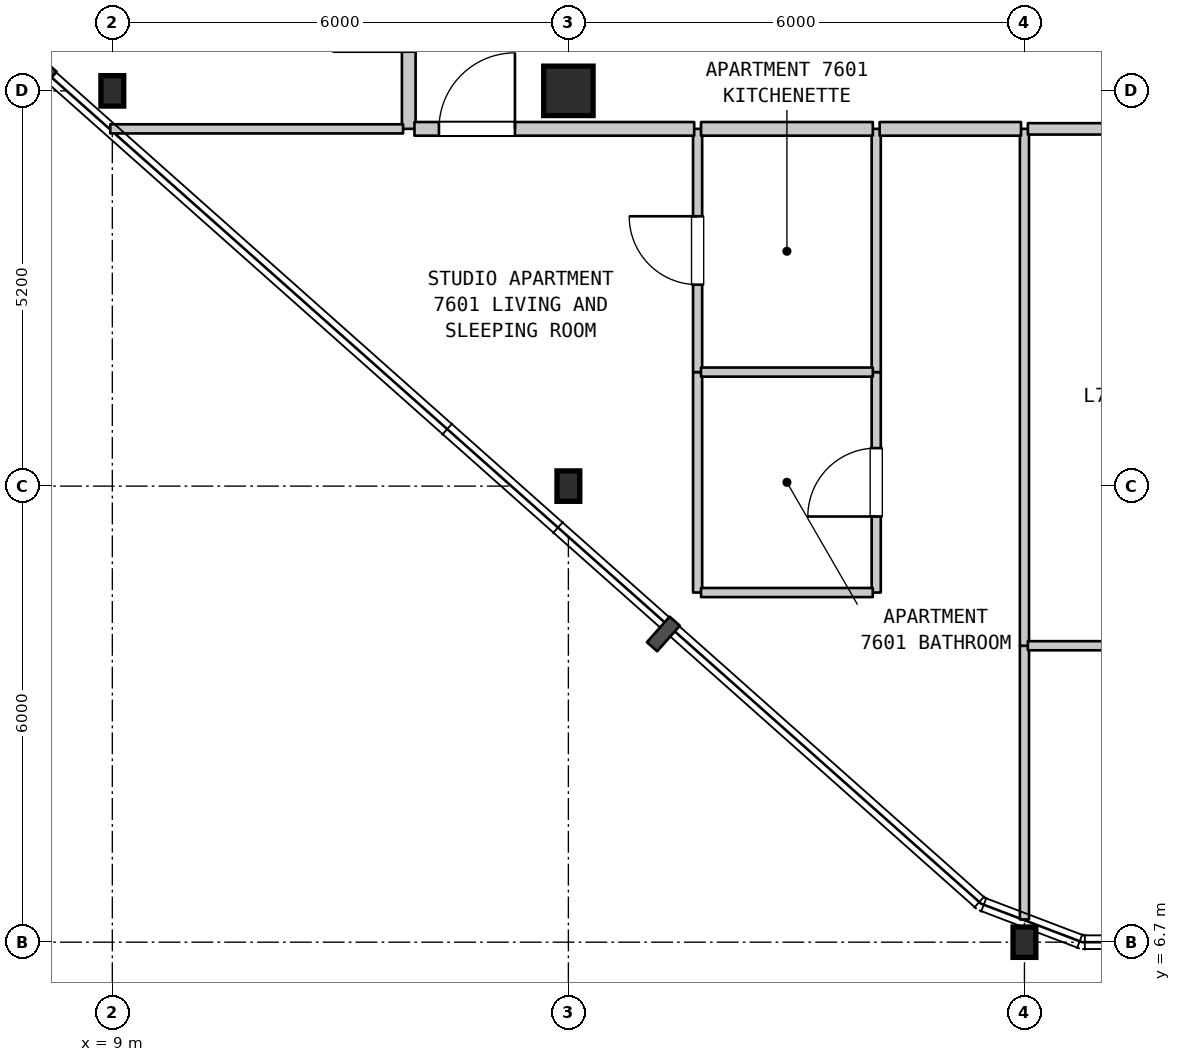
"""IFC4 building model, lengths in metres.
Left out: names, types, materials, properties, quantities, classifications, styles, units other than length and angle.
Written with IfcOpenShell. Run it as: python <this file> out.ifc"""

import sys

from ifc_helpers import new_model, si_unit, direction, frame, frame_2d, origin, origin_2d, place, context, subcontext, project, spatial, rectangle, i_section, extrude, element, fill, save


model = new_model("IFC4")
c1 = context("Model", 3, precision=1e-05, world=origin(), true_north=direction((0.0, 1.0)))
c2 = subcontext(c1, "Body", "Model", "MODEL_VIEW")
j1 = project(units=[si_unit("LENGTHUNIT", "METRE"), si_unit("PLANEANGLEUNIT", "RADIAN")], contexts=[c1])
p1 = place(None, origin())
s1 = spatial("IfcSite", under=j1, at=p1, CompositionType="ELEMENT")
p2 = place(p1, origin())
s2 = spatial("IfcBuilding", under=s1, at=p2, CompositionType="ELEMENT")
p3 = place(p2, frame((0.0, 0.0, 303.6)))
s3 = spatial("IfcBuildingStorey", under=s2, at=p3, CompositionType="ELEMENT", Elevation=303.6)
for number, where, z_axis, x_axis in (
    (1, (9.0, 17.9, 0.0), (0.0, 0.0, 1.0), (1.0, 0.0, 0.0)),
    (2, (15.0, 12.7, 0.0), (0.0, 0.0, 1.0), (1.0, 0.0, 0.0)),
):
    element("IfcColumn", number, at=place(p3, frame(where, z_axis=z_axis, x_axis=x_axis)), inside=s3, PredefinedType="COLUMN", context=c2, shape_type="SweptSolid", body=[
        extrude(i_section(OverallWidth=0.3, OverallDepth=0.4, WebThickness=0.013, FlangeThickness=0.024, FilletRadius=0.027, at=origin_2d()), origin(), (0.0, 0.0, 1.0), 3.7),
    ])
p4 = place(p3, frame((15.0, 17.9, 0.0), z_axis=(0.0, 0.0, 1.0), x_axis=(1.0, 0.0, 0.0)))
e3 = element("IfcColumn", 3, at=p4, inside=s3, PredefinedType="COLUMN", context=c2, shape_type="SweptSolid", body=[
    extrude(rectangle(XDim=0.65, YDim=0.65, at=origin_2d()), origin(), (0.0, 0.0, 1.0), 3.7),
])
p5 = place(p3, frame((21.0, 6.7, 0.0), z_axis=(0.0, 0.0, 1.0), x_axis=(1.0, 0.0, 0.0)))
e4 = element("IfcColumn", 4, at=p5, inside=s3, PredefinedType="COLUMN", context=c2, shape_type="SweptSolid", body=[
    extrude(i_section(OverallWidth=0.3, OverallDepth=0.4, WebThickness=0.013, FlangeThickness=0.024, FilletRadius=0.027, at=origin_2d()), origin(), (0.0, 0.0, 1.0), 3.7),
])
p6 = place(p3, frame((12.9, 17.4, 0.0), z_axis=(0.0, 0.0, 1.0), x_axis=(0.0, 1.0, 0.0)))
e5 = element("IfcWall", 5, at=p6, inside=s3, PredefinedType="STANDARD", context=c2, shape_type="SweptSolid", body=[
    extrude(rectangle(XDim=3.18, YDim=0.18, at=frame_2d((1.59, 0.0))), origin(), (0.0, 0.0, 1.0), 3.39),
])
p7 = place(p6, frame((1.015, 0.0, 0.0)))
e6 = element("IfcOpeningElement", 6, at=p7, cuts=e5, PredefinedType="OPENING", context=c2, shape_type="SweptSolid", body=[
    extrude(rectangle(XDim=1.0, YDim=2.15, at=frame_2d((0.5, 1.075))), frame((0.0, 0.1, 0.0), z_axis=(0.0, -1.0, 0.0), x_axis=(1.0, 0.0, 0.0)), (0.0, 0.0, 1.0), 0.2),
])
p8 = place(p3, frame((16.7, 11.3, 0.0), z_axis=(0.0, 0.0, 1.0), x_axis=(0.0, 1.0, 0.0)))
e7 = element("IfcWall", 7, at=p8, inside=s3, PredefinedType="PARTITIONING", context=c2, shape_type="SweptSolid", body=[
    extrude(rectangle(XDim=2.9, YDim=0.12, at=frame_2d((1.45, 0.0))), origin(), (0.0, 0.0, 1.0), 3.39),
])
p9 = place(p3, frame((16.7, 14.2, 0.0), z_axis=(0.0, 0.0, 1.0), x_axis=(0.0, 1.0, 0.0)))
e8 = element("IfcWall", 8, at=p9, inside=s3, PredefinedType="PARTITIONING", context=c2, shape_type="SweptSolid", body=[
    extrude(rectangle(XDim=3.2, YDim=0.12, at=frame_2d((1.6, 0.0))), origin(), (0.0, 0.0, 1.0), 3.39),
])
p10 = place(p9, frame((1.15, 0.0, 0.0)))
e9 = element("IfcOpeningElement", 9, at=p10, cuts=e8, PredefinedType="OPENING", context=c2, shape_type="SweptSolid", body=[
    extrude(rectangle(XDim=0.9, YDim=2.15, at=frame_2d((0.45, 1.075))), frame((0.0, 0.07, 0.0), z_axis=(0.0, -1.0, 0.0), x_axis=(1.0, 0.0, 0.0)), (0.0, 0.0, 1.0), 0.14),
])
p11 = place(p3, frame((19.05, 11.3, 0.0), z_axis=(0.0, 0.0, 1.0), x_axis=(0.0, 1.0, 0.0)))
e10 = element("IfcWall", 10, at=p11, inside=s3, PredefinedType="PARTITIONING", context=c2, shape_type="SweptSolid", body=[
    extrude(rectangle(XDim=2.9, YDim=0.12, at=frame_2d((1.45, 0.0))), origin(), (0.0, 0.0, 1.0), 3.39),
])
p12 = place(p11, frame((1.0, 0.0, 0.0)))
e11 = element("IfcOpeningElement", 11, at=p12, cuts=e10, PredefinedType="OPENING", context=c2, shape_type="SweptSolid", body=[
    extrude(rectangle(XDim=0.9, YDim=2.1, at=frame_2d((0.45, 1.05))), frame((0.0, 0.07, 0.0), z_axis=(0.0, -1.0, 0.0), x_axis=(1.0, 0.0, 0.0)), (0.0, 0.0, 1.0), 0.14),
])
p13 = place(p3, frame((19.05, 14.2, 0.0), z_axis=(0.0, 0.0, 1.0), x_axis=(0.0, 1.0, 0.0)))
e12 = element("IfcWall", 12, at=p13, inside=s3, PredefinedType="PARTITIONING", context=c2, shape_type="SweptSolid", body=[
    extrude(rectangle(XDim=3.2, YDim=0.12, at=frame_2d((1.6, 0.0))), origin(), (0.0, 0.0, 1.0), 3.39),
])
p14 = place(p3, frame((21.0, 6.999, 0.0), z_axis=(0.0, 0.0, 1.0), x_axis=(0.0, 1.0, 0.0)))
e13 = element("IfcWall", 13, at=p14, inside=s3, PredefinedType="PARTITIONING", context=c2, shape_type="SweptSolid", body=[
    extrude(rectangle(XDim=3.601, YDim=0.12, at=frame_2d((1.801, 0.0))), origin(), (0.0, 0.0, 1.0), 3.39),
])
p15 = place(p3, frame((21.0, 10.6, 0.0), z_axis=(0.0, 0.0, 1.0), x_axis=(0.0, 1.0, 0.0)))
e14 = element("IfcWall", 14, at=p15, inside=s3, PredefinedType="PARTITIONING", context=c2, shape_type="SweptSolid", body=[
    extrude(rectangle(XDim=6.8, YDim=0.12, at=frame_2d((3.4, 0.0))), origin(), (0.0, 0.0, 1.0), 3.39),
])
p16 = place(p3, frame((21.045, 10.6, 0.0), z_axis=(0.0, 0.0, 1.0), x_axis=(1.0, 0.0, 0.0)))
e15 = element("IfcWall", 15, at=p16, inside=s3, PredefinedType="PARTITIONING", context=c2, shape_type="SweptSolid", body=[
    extrude(rectangle(XDim=3.91, YDim=0.12, at=frame_2d((1.955, 0.0))), origin(), (0.0, 0.0, 1.0), 3.39),
])
for number, where, z_axis, x_axis in (
    (16, (16.745, 11.3, 0.0), (0.0, 0.0, 1.0), (1.0, 0.0, 0.0)),
    (17, (16.745, 14.2, 0.0), (0.0, 0.0, 1.0), (1.0, 0.0, 0.0)),
):
    element("IfcWall", number, at=place(p3, frame(where, z_axis=z_axis, x_axis=x_axis)), inside=s3, PredefinedType="PARTITIONING", context=c2, shape_type="SweptSolid", body=[
        extrude(rectangle(XDim=2.26, YDim=0.12, at=frame_2d((1.13, 0.0))), origin(), (0.0, 0.0, 1.0), 3.39),
    ])
p17 = place(p3, frame((8.973, 17.4, 0.0), z_axis=(0.0, 0.0, 1.0), x_axis=(1.0, 0.0, 0.0)))
e18 = element("IfcWall", 18, at=p17, inside=s3, PredefinedType="PARTITIONING", context=c2, shape_type="SweptSolid", body=[
    extrude(rectangle(XDim=3.852, YDim=0.12, at=frame_2d((1.926, 0.0))), origin(), (0.0, 0.0, 1.0), 3.39),
])
p18 = place(p3, frame((12.975, 17.4, 0.0), z_axis=(0.0, 0.0, 1.0), x_axis=(1.0, 0.0, 0.0)))
e19 = element("IfcWall", 19, at=p18, inside=s3, PredefinedType="STANDARD", context=c2, shape_type="SweptSolid", body=[
    extrude(rectangle(XDim=3.68, YDim=0.18, at=frame_2d((1.84, 0.0))), origin(), (0.0, 0.0, 1.0), 3.39),
])
p19 = place(p18, frame((0.322, 0.0, 0.0)))
e20 = element("IfcOpeningElement", 20, at=p19, cuts=e19, PredefinedType="OPENING", context=c2, shape_type="SweptSolid", body=[
    extrude(rectangle(XDim=1.0, YDim=2.15, at=frame_2d((0.5, 1.075))), frame((0.0, 0.1, 0.0), z_axis=(0.0, -1.0, 0.0), x_axis=(1.0, 0.0, 0.0)), (0.0, 0.0, 1.0), 0.2),
])
p20 = place(p3, frame((16.745, 17.4, 0.0), z_axis=(0.0, 0.0, 1.0), x_axis=(1.0, 0.0, 0.0)))
e21 = element("IfcWall", 21, at=p20, inside=s3, PredefinedType="STANDARD", context=c2, shape_type="SweptSolid", body=[
    extrude(rectangle(XDim=2.26, YDim=0.18, at=frame_2d((1.13, 0.0))), origin(), (0.0, 0.0, 1.0), 3.39),
])
p21 = place(p3, frame((19.095, 17.4, 0.0), z_axis=(0.0, 0.0, 1.0), x_axis=(1.0, 0.0, 0.0)))
e22 = element("IfcWall", 22, at=p21, inside=s3, PredefinedType="STANDARD", context=c2, shape_type="SweptSolid", body=[
    extrude(rectangle(XDim=1.86, YDim=0.18, at=frame_2d((0.93, 0.0))), origin(), (0.0, 0.0, 1.0), 3.39),
])
p22 = place(p3, frame((21.045, 17.4, 0.0), z_axis=(0.0, 0.0, 1.0), x_axis=(1.0, 0.0, 0.0)))
e23 = element("IfcWall", 23, at=p22, inside=s3, PredefinedType="STANDARD", context=c2, shape_type="SweptSolid", body=[
    extrude(rectangle(XDim=3.91, YDim=0.15, at=frame_2d((1.955, 0.0))), origin(), (0.0, 0.0, 1.0), 3.39),
])
p23 = place(p22, frame((1.455, 0.0, 0.0)))
e24 = element("IfcOpeningElement", 24, at=p23, cuts=e23, PredefinedType="OPENING", context=c2, shape_type="SweptSolid", body=[
    extrude(rectangle(XDim=1.0, YDim=2.15, at=frame_2d((0.5, 1.075))), frame((0.0, 0.085, 0.0), z_axis=(0.0, -1.0, 0.0), x_axis=(1.0, 0.0, 0.0)), (0.0, 0.0, 1.0), 0.17),
])
p24 = place(p10, origin())
e25 = element("IfcDoor", 25, at=p24, inside=s3, OperationType="SINGLE_SWING_RIGHT", PredefinedType="DOOR", context=c2, shape_type="SweptSolid", body=[
    extrude(rectangle(XDim=0.9, YDim=2.15, at=frame_2d((0.45, 1.075))), frame((0.0, 0.025, 0.0), z_axis=(0.0, -1.0, 0.0), x_axis=(1.0, 0.0, 0.0)), (0.0, 0.0, 1.0), 0.05),
])
fill(e9, e25)
p25 = place(p12, origin())
e26 = element("IfcDoor", 26, at=p25, inside=s3, OperationType="SINGLE_SWING_LEFT", PredefinedType="DOOR", context=c2, shape_type="SweptSolid", body=[
    extrude(rectangle(XDim=0.9, YDim=2.1, at=frame_2d((0.45, 1.05))), frame((0.0, 0.025, 0.0), z_axis=(0.0, -1.0, 0.0), x_axis=(1.0, 0.0, 0.0)), (0.0, 0.0, 1.0), 0.05),
])
fill(e11, e26)
p26 = place(p19, origin())
e27 = element("IfcDoor", 27, at=p26, inside=s3, OperationType="SINGLE_SWING_RIGHT", PredefinedType="DOOR", context=c2, shape_type="SweptSolid", body=[
    extrude(rectangle(XDim=1.0, YDim=2.15, at=frame_2d((0.5, 1.075))), frame((0.0, 0.025, 0.0), z_axis=(0.0, -1.0, 0.0), x_axis=(1.0, 0.0, 0.0)), (0.0, 0.0, 1.0), 0.05),
])
fill(e20, e27)
save(model, sys.argv[1])
